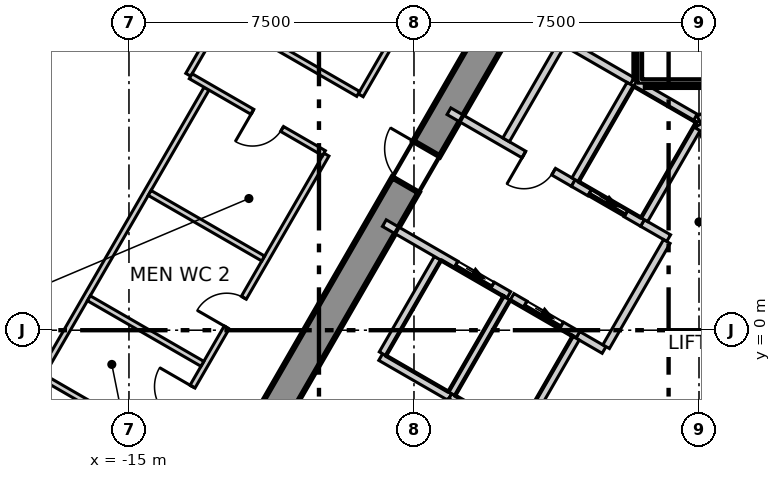
"""IFC4 building model, lengths in metres.
Left out: names, types, materials, properties, quantities, classifications, styles, units other than length and angle.
Written with IfcOpenShell. Run it as: python <this file> out.ifc"""

import sys

from ifc_helpers import new_model, si_unit, direction, frame, frame_2d, origin, place, context, subcontext, project, spatial, polyline, rectangle, outline, extrude, element, fill, save


model = new_model("IFC4")
c1 = context("Model", 3, precision=1e-05, world=origin(), true_north=direction((0.0, 1.0)))
c2 = subcontext(c1, "Body", "Model", "MODEL_VIEW")
j1 = project(units=[si_unit("LENGTHUNIT", "METRE"), si_unit("PLANEANGLEUNIT", "RADIAN")], contexts=[c1])
p1 = place(None, origin())
s1 = spatial("IfcSite", under=j1, at=p1, CompositionType="ELEMENT")
p2 = place(p1, origin())
s2 = spatial("IfcBuilding", under=s1, at=p2, CompositionType="ELEMENT")
p3 = place(p2, frame((0.0, 0.0, 152.3)))
s3 = spatial("IfcBuildingStorey", under=s2, at=p3, CompositionType="ELEMENT", Elevation=152.3)
p4 = place(p3, frame((-1.674, 14.3, -0.3), z_axis=(0.0, 0.0, 1.0), x_axis=(-0.499995765644, -0.866027848477, 0.0)))
e1 = element("IfcWall", 1, at=p4, inside=s3, PredefinedType="SHEAR", context=c2, shape_type="SweptSolid", body=[
    extrude(outline(polyline([(-0.231, -0.4), (1.732, -0.4), (3.695, -0.4), (5.658, -0.4), (7.621, -0.4), (9.584, -0.4), (11.547, -0.4), (13.51, -0.4), (15.473, -0.4), (17.436, -0.4), (19.399, -0.4), (21.362, -0.4), (23.325, -0.4), (22.863, 0.4), (20.977, 0.4), (19.091, 0.4), (17.205, 0.4), (15.319, 0.4), (13.433, 0.4), (11.547, 0.4), (9.661, 0.4), (7.775, 0.4), (5.889, 0.4), (4.003, 0.4), (2.117, 0.4), (0.231, 0.4), (-0.231, -0.4)])), origin(), (0.0, 0.0, 1.0), 4.0),
])
p5 = place(p4, frame((10.997, 0.0, 0.3)))
e2 = element("IfcOpeningElement", 2, at=p5, cuts=e1, PredefinedType="OPENING", context=c2, shape_type="SweptSolid", body=[
    extrude(rectangle(XDim=1.1, YDim=2.1, at=frame_2d((0.55, 1.05))), frame((0.0, 0.41, 0.0), z_axis=(0.0, -1.0, 0.0), x_axis=(1.0, 0.0, 0.0)), (0.0, 0.0, 1.0), 0.82),
])
p6 = place(p4, frame((4.474, 0.0, 0.3)))
e3 = element("IfcOpeningElement", 3, at=p6, cuts=e1, PredefinedType="OPENING", context=c2, shape_type="SweptSolid", body=[
    extrude(rectangle(XDim=0.9, YDim=2.1, at=frame_2d((0.45, 1.05))), frame((0.0, 0.41, 0.0), z_axis=(0.0, -1.0, 0.0), x_axis=(1.0, 0.0, 0.0)), (0.0, 0.0, 1.0), 0.82),
])
p7 = place(p3, frame((-3.018, 33.666, 0.0), z_axis=(0.0, 0.0, 1.0), x_axis=(-0.499984613623, -0.866034286931, 0.0)))
e4 = element("IfcWall", 4, at=p7, inside=s3, PredefinedType="ELEMENTEDWALL", context=c2, shape_type="SweptSolid", body=[
    extrude(rectangle(XDim=55.274, YDim=0.2, at=frame_2d((27.637, 0.0))), origin(), (0.0, 0.0, 1.0), 3.7),
])
p8 = place(p7, frame((2.145, 0.0, 0.9)))
e5 = element("IfcOpeningElement", 5, at=p8, cuts=e4, PredefinedType="OPENING", context=c2, shape_type="SweptSolid", body=[
    extrude(rectangle(XDim=4.9, YDim=2.5, at=frame_2d((2.45, 1.25))), frame((0.0, 0.11, 0.0), z_axis=(0.0, -1.0, 0.0), x_axis=(1.0, 0.0, 0.0)), (0.0, 0.0, 1.0), 0.22),
])
p9 = place(p7, frame((8.731, 0.0, 0.9)))
e6 = element("IfcOpeningElement", 6, at=p9, cuts=e4, PredefinedType="OPENING", context=c2, shape_type="SweptSolid", body=[
    extrude(rectangle(XDim=4.9, YDim=2.5, at=frame_2d((2.45, 1.25))), frame((0.0, 0.11, 0.0), z_axis=(0.0, -1.0, 0.0), x_axis=(1.0, 0.0, 0.0)), (0.0, 0.0, 1.0), 0.22),
])
p10 = place(p7, frame((15.318, 0.0, 0.9)))
e7 = element("IfcOpeningElement", 7, at=p10, cuts=e4, PredefinedType="OPENING", context=c2, shape_type="SweptSolid", body=[
    extrude(rectangle(XDim=4.9, YDim=2.5, at=frame_2d((2.45, 1.25))), frame((0.0, 0.11, 0.0), z_axis=(0.0, -1.0, 0.0), x_axis=(1.0, 0.0, 0.0)), (0.0, 0.0, 1.0), 0.22),
])
p11 = place(p7, frame((21.904, 0.0, 0.9)))
e8 = element("IfcOpeningElement", 8, at=p11, cuts=e4, PredefinedType="OPENING", context=c2, shape_type="SweptSolid", body=[
    extrude(rectangle(XDim=4.9, YDim=2.5, at=frame_2d((2.45, 1.25))), frame((0.0, 0.11, 0.0), z_axis=(0.0, -1.0, 0.0), x_axis=(1.0, 0.0, 0.0)), (0.0, 0.0, 1.0), 0.22),
])
p12 = place(p7, frame((28.49, 0.0, 0.9)))
e9 = element("IfcOpeningElement", 9, at=p12, cuts=e4, PredefinedType="OPENING", context=c2, shape_type="SweptSolid", body=[
    extrude(rectangle(XDim=4.9, YDim=2.5, at=frame_2d((2.45, 1.25))), frame((0.0, 0.11, 0.0), z_axis=(0.0, -1.0, 0.0), x_axis=(1.0, 0.0, 0.0)), (0.0, 0.0, 1.0), 0.22),
])
p13 = place(p7, frame((35.076, 0.0, 0.9)))
e10 = element("IfcOpeningElement", 10, at=p13, cuts=e4, PredefinedType="OPENING", context=c2, shape_type="SweptSolid", body=[
    extrude(rectangle(XDim=4.9, YDim=2.5, at=frame_2d((2.45, 1.25))), frame((0.0, 0.11, 0.0), z_axis=(0.0, -1.0, 0.0), x_axis=(1.0, 0.0, 0.0)), (0.0, 0.0, 1.0), 0.22),
])
p14 = place(p7, frame((41.662, 0.0, 0.9)))
e11 = element("IfcOpeningElement", 11, at=p14, cuts=e4, PredefinedType="OPENING", context=c2, shape_type="SweptSolid", body=[
    extrude(rectangle(XDim=4.9, YDim=2.5, at=frame_2d((2.45, 1.25))), frame((0.0, 0.11, 0.0), z_axis=(0.0, -1.0, 0.0), x_axis=(1.0, 0.0, 0.0)), (0.0, 0.0, 1.0), 0.22),
])
p15 = place(p7, frame((48.248, 0.0, 0.9)))
e12 = element("IfcOpeningElement", 12, at=p15, cuts=e4, PredefinedType="OPENING", context=c2, shape_type="SweptSolid", body=[
    extrude(rectangle(XDim=4.9, YDim=2.5, at=frame_2d((2.45, 1.25))), frame((0.0, 0.11, 0.0), z_axis=(0.0, -1.0, 0.0), x_axis=(1.0, 0.0, 0.0)), (0.0, 0.0, 1.0), 0.22),
])
p16 = place(p3, frame((-23.357, -1.725, 0.0), z_axis=(0.0, 0.0, 1.0), x_axis=(0.866045766046, -0.49996472987, 0.0)))
e13 = element("IfcWall", 13, at=p16, inside=s3, PredefinedType="PARTITIONING", context=c2, shape_type="SweptSolid", body=[
    extrude(rectangle(XDim=8.49, YDim=0.15, at=frame_2d((4.245, 0.0))), origin(), (0.0, 0.0, 1.0), 3.7),
])
p17 = place(p3, frame((-18.631, -10.67, 0.0), z_axis=(0.0, 0.0, 1.0), x_axis=(0.500017706633, 0.866015180614, 0.0)))
e14 = element("IfcWall", 14, at=p17, inside=s3, PredefinedType="PARTITIONING", context=c2, shape_type="SweptSolid", body=[
    extrude(rectangle(XDim=17.656, YDim=0.15, at=frame_2d((8.828, 0.0))), origin(), (0.0, 0.0, 1.0), 3.7),
])
p18 = place(p17, frame((6.606, 0.0, 0.0)))
e15 = element("IfcOpeningElement", 15, at=p18, cuts=e14, PredefinedType="OPENING", context=c2, shape_type="SweptSolid", body=[
    extrude(rectangle(XDim=1.1, YDim=2.1, at=frame_2d((0.55, 1.05))), frame((0.0, 0.085, 0.0), z_axis=(0.0, -1.0, 0.0), x_axis=(1.0, 0.0, 0.0)), (0.0, 0.0, 1.0), 0.17),
])
p19 = place(p17, frame((12.406, 0.0, 0.0)))
e16 = element("IfcOpeningElement", 16, at=p19, cuts=e14, PredefinedType="OPENING", context=c2, shape_type="SweptSolid", body=[
    extrude(rectangle(XDim=0.9, YDim=2.1, at=frame_2d((0.45, 1.05))), frame((0.0, 0.085, 0.0), z_axis=(0.0, -1.0, 0.0), x_axis=(1.0, 0.0, 0.0)), (0.0, 0.0, 1.0), 0.17),
])
p20 = place(p17, frame((9.606, 0.0, 0.0)))
e17 = element("IfcOpeningElement", 17, at=p20, cuts=e14, PredefinedType="OPENING", context=c2, shape_type="SweptSolid", body=[
    extrude(rectangle(XDim=1.0, YDim=2.1, at=frame_2d((0.5, 1.05))), frame((0.0, 0.085, 0.0), z_axis=(0.0, -1.0, 0.0), x_axis=(1.0, 0.0, 0.0)), (0.0, 0.0, 1.0), 0.17),
])
p21 = place(p17, frame((2.034, 0.0, 0.0)))
e18 = element("IfcOpeningElement", 18, at=p21, cuts=e14, PredefinedType="OPENING", context=c2, shape_type="SweptSolid", body=[
    extrude(rectangle(XDim=1.1, YDim=2.1, at=frame_2d((0.55, 1.05))), frame((0.0, 0.085, 0.0), z_axis=(0.0, -1.0, 0.0), x_axis=(1.0, 0.0, 0.0)), (0.0, 0.0, 1.0), 0.17),
])
p22 = place(p3, frame((-8.902, 6.181, 0.0), z_axis=(0.0, 0.0, 1.0), x_axis=(0.499992688384, 0.866029625107, 0.0)))
e19 = element("IfcWall", 19, at=p22, inside=s3, PredefinedType="PARTITIONING", context=c2, shape_type="SweptSolid", body=[
    extrude(rectangle(XDim=17.804, YDim=0.15, at=frame_2d((8.902, 0.0))), origin(), (0.0, 0.0, 1.0), 3.7),
])
p23 = place(p22, frame((14.554, 0.0, 0.0)))
e20 = element("IfcOpeningElement", 20, at=p23, cuts=e19, PredefinedType="OPENING", context=c2, shape_type="SweptSolid", body=[
    extrude(rectangle(XDim=1.0, YDim=2.1, at=frame_2d((0.5, 1.05))), frame((0.0, 0.085, 0.0), z_axis=(0.0, -1.0, 0.0), x_axis=(1.0, 0.0, 0.0)), (0.0, 0.0, 1.0), 0.17),
])
p24 = place(p22, frame((5.62, 0.0, 0.0)))
e21 = element("IfcOpeningElement", 21, at=p24, cuts=e19, PredefinedType="OPENING", context=c2, shape_type="SweptSolid", body=[
    extrude(rectangle(XDim=1.1, YDim=2.1, at=frame_2d((0.55, 1.05))), frame((0.0, 0.085, 0.0), z_axis=(0.0, -1.0, 0.0), x_axis=(1.0, 0.0, 0.0)), (0.0, 0.0, 1.0), 0.17),
])
p25 = place(p3, frame((-17.321, -1.2, 0.0), z_axis=(0.0, 0.0, 1.0), x_axis=(0.500054279689, 0.865994063124, 0.0)))
e22 = element("IfcWall", 22, at=p25, inside=s3, PredefinedType="PARTITIONING", context=c2, shape_type="SweptSolid", body=[
    extrude(rectangle(XDim=8.725, YDim=0.15, at=frame_2d((4.363, 0.0))), origin(), (0.0, 0.0, 1.0), 3.7),
])
p26 = place(p3, frame((-17.256, -1.238, 0.0), z_axis=(0.0, 0.0, 1.0), x_axis=(0.866061862632, -0.499936846106, 0.0)))
e23 = element("IfcWall", 23, at=p26, inside=s3, PredefinedType="PARTITIONING", context=c2, shape_type="SweptSolid", body=[
    extrude(rectangle(XDim=3.45, YDim=0.15, at=frame_2d((1.725, 0.0))), origin(), (0.0, 0.0, 1.0), 3.7),
])
p27 = place(p3, frame((-16.056, 0.841, 0.0), z_axis=(0.0, 0.0, 1.0), x_axis=(0.866013532718, -0.500020560727, 0.0)))
e24 = element("IfcWall", 24, at=p27, inside=s3, PredefinedType="PARTITIONING", context=c2, shape_type="SweptSolid", body=[
    extrude(rectangle(XDim=3.45, YDim=0.15, at=frame_2d((1.725, 0.0))), origin(), (0.0, 0.0, 1.0), 3.7),
])
p28 = place(p3, frame((-14.456, 3.612, 0.0), z_axis=(0.0, 0.0, 1.0), x_axis=(0.866031223622, -0.49998991961, 0.0)))
e25 = element("IfcWall", 25, at=p28, inside=s3, PredefinedType="PARTITIONING", context=c2, shape_type="SweptSolid", body=[
    extrude(rectangle(XDim=3.45, YDim=0.15, at=frame_2d((1.725, 0.0))), origin(), (0.0, 0.0, 1.0), 3.7),
])
p29 = place(p3, frame((-13.44, 6.721, 0.0), z_axis=(0.0, 0.0, 1.0), x_axis=(0.499902469156, 0.866081705922, 0.0)))
e26 = element("IfcWall", 26, at=p29, inside=s3, PredefinedType="PARTITIONING", context=c2, shape_type="SweptSolid", body=[
    extrude(rectangle(XDim=1.8, YDim=0.15, at=frame_2d((0.9, 0.0))), origin(), (0.0, 0.0, 1.0), 3.7),
])
p30 = place(p3, frame((-12.475, 8.242, 0.0), z_axis=(0.0, 0.0, 1.0), x_axis=(0.866060059865, -0.499939969103, 0.0)))
e27 = element("IfcWall", 27, at=p30, inside=s3, PredefinedType="PARTITIONING", context=c2, shape_type="SweptSolid", body=[
    extrude(rectangle(XDim=4.048, YDim=0.15, at=frame_2d((2.024, 0.0))), origin(), (0.0, 0.0, 1.0), 3.7),
])
p31 = place(p3, frame((-13.375, 6.683, 0.0), z_axis=(0.0, 0.0, 1.0), x_axis=(0.866033948129, -0.499985200469, 0.0)))
e28 = element("IfcWall", 28, at=p31, inside=s3, PredefinedType="PARTITIONING", context=c2, shape_type="SweptSolid", body=[
    extrude(rectangle(XDim=4.048, YDim=0.15, at=frame_2d((2.024, 0.0))), origin(), (0.0, 0.0, 1.0), 3.7),
])
p32 = place(p31, frame((1.875, 0.0, 0.0)))
e29 = element("IfcOpeningElement", 29, at=p32, cuts=e28, PredefinedType="OPENING", context=c2, shape_type="SweptSolid", body=[
    extrude(rectangle(XDim=0.9, YDim=2.1, at=frame_2d((0.45, 1.05))), frame((0.0, 0.085, 0.0), z_axis=(0.0, -1.0, 0.0), x_axis=(1.0, 0.0, 0.0)), (0.0, 0.0, 1.0), 0.17),
])
p33 = place(p3, frame((0.076, 21.468, 0.0), z_axis=(0.0, 0.0, 1.0), x_axis=(0.500006592492, -0.866021597574, 0.0)))
e30 = element("IfcWall", 30, at=p33, inside=s3, PredefinedType="PARTITIONING", context=c2, shape_type="SweptSolid", body=[
    extrude(rectangle(XDim=17.652, YDim=0.15, at=frame_2d((8.826, 0.0))), origin(), (0.0, 0.0, 1.0), 3.7),
])
p34 = place(p33, frame((8.204, 0.0, 0.0)))
e31 = element("IfcOpeningElement", 31, at=p34, cuts=e30, PredefinedType="OPENING", context=c2, shape_type="SweptSolid", body=[
    extrude(rectangle(XDim=1.1, YDim=2.1, at=frame_2d((0.55, 1.05))), frame((0.0, 0.085, 0.0), z_axis=(0.0, -1.0, 0.0), x_axis=(1.0, 0.0, 0.0)), (0.0, 0.0, 1.0), 0.17),
])
p35 = place(p3, frame((-8.376, -0.707, 0.0), z_axis=(0.0, 0.0, 1.0), x_axis=(0.866067520717, -0.499927044236, 0.0)))
e32 = element("IfcWall", 32, at=p35, inside=s3, PredefinedType="SOLIDWALL", context=c2, shape_type="SweptSolid", body=[
    extrude(rectangle(XDim=2.1, YDim=0.2, at=frame_2d((1.05, 0.0))), origin(), (0.0, 0.0, 1.0), 3.7),
])
p36 = place(p3, frame((-8.326, -0.62, 0.0), z_axis=(0.0, 0.0, 1.0), x_axis=(0.500023687443, 0.866011727401, 0.0)))
e33 = element("IfcWall", 33, at=p36, inside=s3, PredefinedType="SOLIDWALL", context=c2, shape_type="SweptSolid", body=[
    extrude(rectangle(XDim=2.9, YDim=0.2, at=frame_2d((1.45, 0.0))), origin(), (0.0, 0.0, 1.0), 3.7),
])
p37 = place(p3, frame((-0.002, 5.541, 0.0), z_axis=(0.0, 0.0, 1.0), x_axis=(0.86600155993, 0.500041296494, 0.0)))
e34 = element("IfcWall", 34, at=p37, inside=s3, PredefinedType="SOLIDWALL", context=c2, shape_type="SweptSolid", body=[
    extrude(rectangle(XDim=4.132, YDim=0.2, at=frame_2d((2.066, 0.0))), origin(), (0.0, 0.0, 1.0), 3.7),
])
p38 = place(p3, frame((0.0, 5.4, 0.0), z_axis=(0.0, 0.0, 1.0), x_axis=(0.500103862429, -0.865965430478, 0.0)))
e35 = element("IfcWall", 35, at=p38, inside=s3, PredefinedType="SOLIDWALL", context=c2, shape_type="SweptSolid", body=[
    extrude(rectangle(XDim=2.973, YDim=0.2, at=frame_2d((1.487, 0.0))), origin(), (0.0, 0.0, 1.0), 3.7),
])
p39 = place(p38, frame((0.937, 0.0, 0.0)))
e36 = element("IfcOpeningElement", 36, at=p39, cuts=e35, PredefinedType="OPENING", context=c2, shape_type="SweptSolid", body=[
    extrude(rectangle(XDim=1.1, YDim=2.1, at=frame_2d((0.55, 1.05))), frame((0.0, 0.11, 0.0), z_axis=(0.0, -1.0, 0.0), x_axis=(1.0, 0.0, 0.0)), (0.0, 0.0, 1.0), 0.22),
])
p40 = place(p3, frame((-8.28, 2.818, 0.0), z_axis=(0.0, 0.0, 1.0), x_axis=(0.86600175068, -0.50004096614, 0.0)))
e37 = element("IfcWall", 37, at=p40, inside=s3, PredefinedType="SOLIDWALL", context=c2, shape_type="SweptSolid", body=[
    extrude(rectangle(XDim=3.782, YDim=0.2, at=frame_2d((1.891, 0.0))), origin(), (0.0, 0.0, 1.0), 3.7),
])
p41 = place(p40, frame((2.18, 0.0, 0.0)))
e38 = element("IfcOpeningElement", 38, at=p41, cuts=e37, PredefinedType="OPENING", context=c2, shape_type="SweptSolid", body=[
    extrude(rectangle(XDim=1.1, YDim=2.1, at=frame_2d((0.55, 1.05))), frame((0.0, 0.11, 0.0), z_axis=(0.0, -1.0, 0.0), x_axis=(1.0, 0.0, 0.0)), (0.0, 0.0, 1.0), 0.22),
])
p42 = place(p3, frame((-3.188, -0.122, 0.0), z_axis=(0.0, 0.0, 1.0), x_axis=(0.865705793592, -0.50055317294, 0.0)))
e39 = element("IfcWall", 39, at=p42, inside=s3, PredefinedType="SOLIDWALL", context=c2, shape_type="SweptSolid", body=[
    extrude(rectangle(XDim=0.797, YDim=0.2, at=frame_2d((0.398, 0.0))), origin(), (0.0, 0.0, 1.0), 3.7),
])
p43 = place(p3, frame((-6.58, 5.762, 0.0), z_axis=(0.0, 0.0, 1.0), x_axis=(0.866029704776, -0.49999255039, 0.0)))
e40 = element("IfcWall", 40, at=p43, inside=s3, PredefinedType="SOLIDWALL", context=c2, shape_type="SweptSolid", body=[
    extrude(rectangle(XDim=3.782, YDim=0.2, at=frame_2d((1.891, 0.0))), origin(), (0.0, 0.0, 1.0), 3.7),
])
p44 = place(p43, frame((2.279, 0.0, 0.0)))
e41 = element("IfcOpeningElement", 41, at=p44, cuts=e40, PredefinedType="OPENING", context=c2, shape_type="SweptSolid", body=[
    extrude(rectangle(XDim=0.9, YDim=2.1, at=frame_2d((0.45, 1.05))), frame((0.0, 0.11, 0.0), z_axis=(0.0, -1.0, 0.0), x_axis=(1.0, 0.0, 0.0)), (0.0, 0.0, 1.0), 0.22),
])
p45 = place(p3, frame((-1.488, 2.822, 0.0), z_axis=(0.0, 0.0, 1.0), x_axis=(0.866236612152, -0.499633997809, 0.0)))
e42 = element("IfcWall", 42, at=p45, inside=s3, PredefinedType="SOLIDWALL", context=c2, shape_type="SweptSolid", body=[
    extrude(rectangle(XDim=0.796, YDim=0.2, at=frame_2d((0.398, 0.0))), origin(), (0.0, 0.0, 1.0), 3.7),
])
p46 = place(p3, frame((-5.076, 5.009, 0.0), z_axis=(0.0, 0.0, 1.0), x_axis=(0.50002537861, 0.866010750942, 0.0)))
e43 = element("IfcWall", 43, at=p46, inside=s3, PredefinedType="SOLIDWALL", context=c2, shape_type="SweptSolid", body=[
    extrude(rectangle(XDim=3.0, YDim=0.2, at=frame_2d((1.5, 0.0))), origin(), (0.0, 0.0, 1.0), 3.7),
])
p47 = place(p3, frame((-3.489, 7.557, 0.0), z_axis=(0.0, 0.0, 1.0), x_axis=(0.866010750942, -0.50002537861, 0.0)))
e44 = element("IfcWall", 44, at=p47, inside=s3, PredefinedType="SOLIDWALL", context=c2, shape_type="SweptSolid", body=[
    extrude(rectangle(XDim=2.0, YDim=0.2, at=frame_2d((1.0, 0.0))), origin(), (0.0, 0.0, 1.0), 3.7),
])
p48 = place(p3, frame((-2.444, -0.433, 0.0), z_axis=(0.0, 0.0, 1.0), x_axis=(0.500035624827, 0.866004834804, 0.0)))
e45 = element("IfcWall", 45, at=p48, inside=s3, PredefinedType="SOLIDWALL", context=c2, shape_type="SweptSolid", body=[
    extrude(rectangle(XDim=3.194, YDim=0.2, at=frame_2d((1.597, 0.0))), origin(), (0.0, 0.0, 1.0), 3.7),
])
p49 = place(p3, frame((-6.557, -1.757, 0.0), z_axis=(0.0, 0.0, 1.0), x_axis=(0.8659754619, -0.500086491905, 0.0)))
e46 = element("IfcWall", 46, at=p49, inside=s3, PredefinedType="SOLIDWALL", context=c2, shape_type="SweptSolid", body=[
    extrude(rectangle(XDim=1.916, YDim=0.2, at=frame_2d((0.958, 0.0))), origin(), (0.0, 0.0, 1.0), 3.7),
])
p50 = place(p3, frame((-6.507, -1.67, 0.0), z_axis=(0.0, 0.0, 1.0), x_axis=(0.50012328804, 0.865954211699, 0.0)))
e47 = element("IfcWall", 47, at=p50, inside=s3, PredefinedType="SOLIDWALL", context=c2, shape_type="SweptSolid", body=[
    extrude(rectangle(XDim=2.9, YDim=0.2, at=frame_2d((1.45, 0.0))), origin(), (0.0, 0.0, 1.0), 3.7),
])
p51 = place(p3, frame((-4.92, 0.878, 0.0), z_axis=(0.0, 0.0, 1.0), x_axis=(0.866010750942, -0.50002537861, 0.0)))
e48 = element("IfcWall", 48, at=p51, inside=s3, PredefinedType="SOLIDWALL", context=c2, shape_type="SweptSolid", body=[
    extrude(rectangle(XDim=2.0, YDim=0.2, at=frame_2d((1.0, 0.0))), origin(), (0.0, 0.0, 1.0), 3.7),
])
p52 = place(p51, frame((0.4, 0.0, 0.0)))
e49 = element("IfcOpeningElement", 49, at=p52, cuts=e48, PredefinedType="OPENING", context=c2, shape_type="SweptSolid", body=[
    extrude(rectangle(XDim=1.1, YDim=2.1, at=frame_2d((0.55, 1.05))), frame((0.0, 0.11, 0.0), z_axis=(0.0, -1.0, 0.0), x_axis=(1.0, 0.0, 0.0)), (0.0, 0.0, 1.0), 0.22),
])
p53 = place(p3, frame((-4.619, -2.6, 0.0), z_axis=(0.0, 0.0, 1.0), x_axis=(0.50009492287, 0.865970593103, 0.0)))
e50 = element("IfcWall", 50, at=p53, inside=s3, PredefinedType="SOLIDWALL", context=c2, shape_type="SweptSolid", body=[
    extrude(rectangle(XDim=2.761, YDim=0.2, at=frame_2d((1.381, 0.0))), origin(), (0.0, 0.0, 1.0), 3.7),
])
p54 = place(p3, frame((-3.309, 3.873, 0.0), z_axis=(0.0, 0.0, 1.0), x_axis=(0.866098583652, -0.499873227325, 0.0)))
e51 = element("IfcWall", 51, at=p54, inside=s3, PredefinedType="SOLIDWALL", context=c2, shape_type="SweptSolid", body=[
    extrude(rectangle(XDim=2.103, YDim=0.2, at=frame_2d((1.051, 0.0))), origin(), (0.0, 0.0, 1.0), 3.7),
])
p55 = place(p54, frame((0.502, 0.0, 0.0)))
e52 = element("IfcOpeningElement", 52, at=p55, cuts=e51, PredefinedType="OPENING", context=c2, shape_type="SweptSolid", body=[
    extrude(rectangle(XDim=1.1, YDim=2.1, at=frame_2d((0.55, 1.05))), frame((0.0, 0.11, 0.0), z_axis=(0.0, -1.0, 0.0), x_axis=(1.0, 0.0, 0.0)), (0.0, 0.0, 1.0), 0.22),
])
p56 = place(p3, frame((-3.257, 3.959, 0.0), z_axis=(0.0, 0.0, 1.0), x_axis=(0.50012328804, 0.865954211699, 0.0)))
e53 = element("IfcWall", 53, at=p56, inside=s3, PredefinedType="SOLIDWALL", context=c2, shape_type="SweptSolid", body=[
    extrude(rectangle(XDim=2.9, YDim=0.2, at=frame_2d((1.45, 0.0))), origin(), (0.0, 0.0, 1.0), 3.7),
])
p57 = place(p3, frame((-1.67, 6.507, 0.0), z_axis=(0.0, 0.0, 1.0), x_axis=(0.865941441609, -0.500145398563, 0.0)))
e54 = element("IfcWall", 54, at=p57, inside=s3, PredefinedType="SOLIDWALL", context=c2, shape_type="SweptSolid", body=[
    extrude(rectangle(XDim=1.815, YDim=0.2, at=frame_2d((0.908, 0.0))), origin(), (0.0, 0.0, 1.0), 3.7),
])
p58 = place(p3, frame((-1.438, 2.909, 0.0), z_axis=(0.0, 0.0, 1.0), x_axis=(0.499829630636, 0.866123744241, 0.0)))
e55 = element("IfcWall", 55, at=p58, inside=s3, PredefinedType="SOLIDWALL", context=c2, shape_type="SweptSolid", body=[
    extrude(rectangle(XDim=2.761, YDim=0.2, at=frame_2d((1.38, 0.0))), origin(), (0.0, 0.0, 1.0), 3.7),
])
p59 = place(p3, frame((-1.4, 6.5, 0.0), z_axis=(0.0, 0.0, 1.0), x_axis=(1.0, 0.0, 0.0)))
e56 = element("IfcWall", 56, at=p59, inside=s3, PredefinedType="SOLIDWALL", context=c2, shape_type="SweptSolid", body=[
    extrude(rectangle(XDim=2.8, YDim=0.2, at=frame_2d((1.4, 0.0))), origin(), (0.0, 0.0, 1.0), 3.7),
])
p60 = place(p3, frame((-1.6, 6.615, 0.0), z_axis=(0.0, 0.0, 1.0), x_axis=(0.0, 1.0, 0.0)))
e57 = element("IfcWall", 57, at=p60, inside=s3, PredefinedType="SOLIDWALL", context=c2, shape_type="SweptSolid", body=[
    extrude(rectangle(XDim=7.665, YDim=0.2, at=frame_2d((3.833, 0.0))), origin(), (0.0, 0.0, 1.0), 3.7),
])
p61 = place(p52, origin())
e58 = element("IfcDoor", 58, at=p61, inside=s3, OperationType="SLIDING_TO_LEFT", PredefinedType="DOOR", context=c2, shape_type="SweptSolid", body=[
    extrude(rectangle(XDim=1.1, YDim=2.1, at=frame_2d((0.55, 1.05))), frame((0.0, 0.025, 0.0), z_axis=(0.0, -1.0, 0.0), x_axis=(1.0, 0.0, 0.0)), (0.0, 0.0, 1.0), 0.05),
])
fill(e49, e58)
p62 = place(p55, origin())
e59 = element("IfcDoor", 59, at=p62, inside=s3, OperationType="SLIDING_TO_LEFT", PredefinedType="DOOR", context=c2, shape_type="SweptSolid", body=[
    extrude(rectangle(XDim=1.1, YDim=2.1, at=frame_2d((0.55, 1.05))), frame((0.0, 0.025, 0.0), z_axis=(0.0, -1.0, 0.0), x_axis=(1.0, 0.0, 0.0)), (0.0, 0.0, 1.0), 0.05),
])
fill(e52, e59)
p63 = place(p41, origin())
e60 = element("IfcDoor", 60, at=p63, inside=s3, OperationType="SLIDING_TO_LEFT", PredefinedType="DOOR", context=c2, shape_type="SweptSolid", body=[
    extrude(rectangle(XDim=1.1, YDim=2.1, at=frame_2d((0.55, 1.05))), frame((0.0, 0.025, 0.0), z_axis=(0.0, -1.0, 0.0), x_axis=(1.0, 0.0, 0.0)), (0.0, 0.0, 1.0), 0.05),
])
fill(e38, e60)
p64 = place(p44, origin())
e61 = element("IfcDoor", 61, at=p64, inside=s3, OperationType="SINGLE_SWING_LEFT", PredefinedType="DOOR", context=c2, shape_type="SweptSolid", body=[
    extrude(rectangle(XDim=0.9, YDim=2.1, at=frame_2d((0.45, 1.05))), frame((0.0, 0.025, 0.0), z_axis=(0.0, -1.0, 0.0), x_axis=(1.0, 0.0, 0.0)), (0.0, 0.0, 1.0), 0.05),
])
fill(e41, e61)
p65 = place(p32, origin())
e62 = element("IfcDoor", 62, at=p65, inside=s3, OperationType="SINGLE_SWING_LEFT", PredefinedType="DOOR", context=c2, shape_type="SweptSolid", body=[
    extrude(rectangle(XDim=0.9, YDim=2.1, at=frame_2d((0.45, 1.05))), frame((0.0, 0.025, 0.0), z_axis=(0.0, -1.0, 0.0), x_axis=(1.0, 0.0, 0.0)), (0.0, 0.0, 1.0), 0.05),
])
fill(e29, e62)
p66 = place(p19, origin())
e63 = element("IfcDoor", 63, at=p66, inside=s3, OperationType="SINGLE_SWING_RIGHT", PredefinedType="DOOR", context=c2, shape_type="SweptSolid", body=[
    extrude(rectangle(XDim=0.9, YDim=2.1, at=frame_2d((0.45, 1.05))), frame((0.0, 0.025, 0.0), z_axis=(0.0, -1.0, 0.0), x_axis=(1.0, 0.0, 0.0)), (0.0, 0.0, 1.0), 0.05),
])
fill(e16, e63)
p67 = place(p20, origin())
e64 = element("IfcDoor", 64, at=p67, inside=s3, OperationType="SINGLE_SWING_LEFT", PredefinedType="DOOR", context=c2, shape_type="SweptSolid", body=[
    extrude(rectangle(XDim=1.0, YDim=2.1, at=frame_2d((0.5, 1.05))), frame((0.0, 0.025, 0.0), z_axis=(0.0, -1.0, 0.0), x_axis=(1.0, 0.0, 0.0)), (0.0, 0.0, 1.0), 0.05),
])
fill(e17, e64)
p68 = place(p5, origin())
e65 = element("IfcDoor", 65, at=p68, inside=s3, OperationType="SINGLE_SWING_LEFT", PredefinedType="DOOR", context=c2, shape_type="SweptSolid", body=[
    extrude(rectangle(XDim=1.1, YDim=2.1, at=frame_2d((0.55, 1.05))), frame((0.0, 0.025, 0.0), z_axis=(0.0, -1.0, 0.0), x_axis=(1.0, 0.0, 0.0)), (0.0, 0.0, 1.0), 0.05),
])
fill(e2, e65)
save(model, sys.argv[1])
